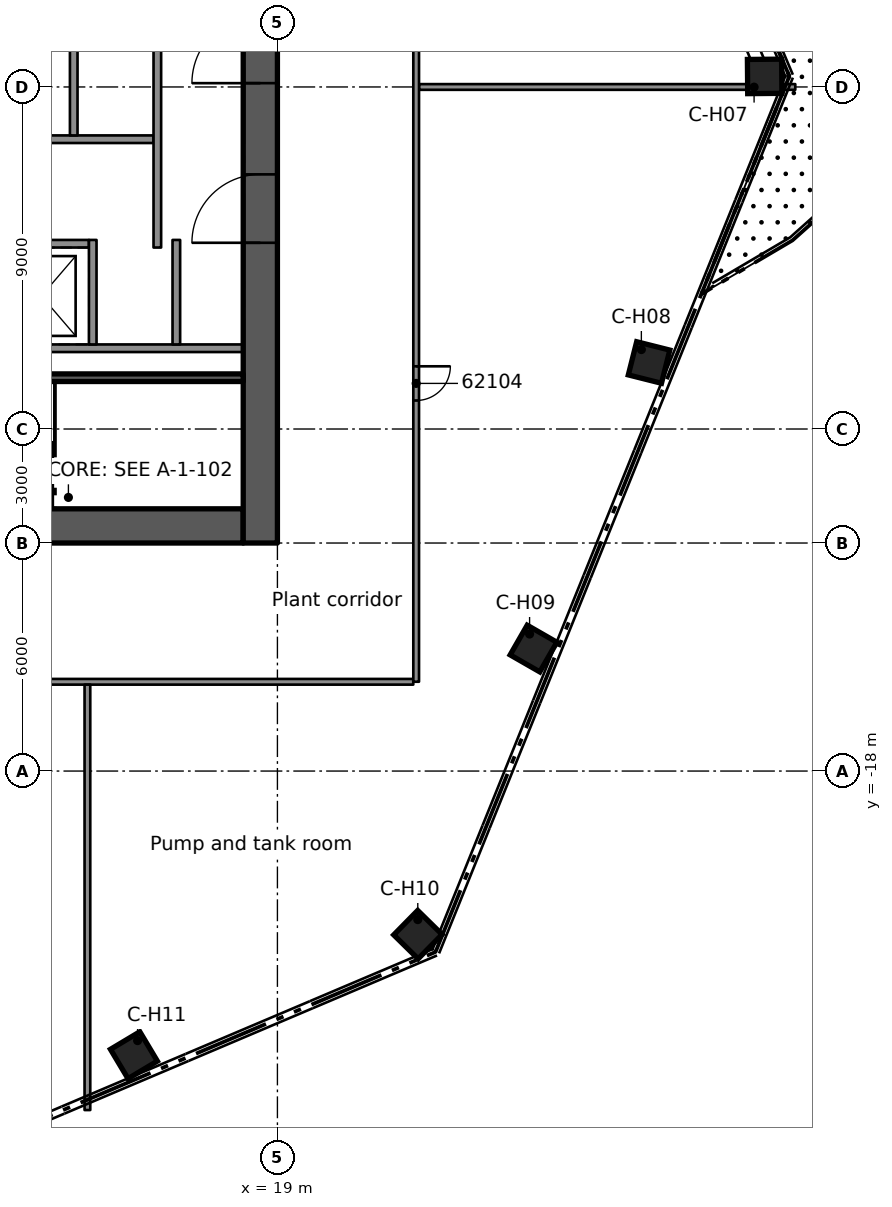
"""IFC4 building model, lengths in metres.
Left out: names, types, materials, properties, quantities, classifications, styles, units other than length and angle.
Written with IfcOpenShell. Run it as: python <this file> out.ifc"""

import sys

from ifc_helpers import new_model, si_unit, direction, frame, frame_2d, origin, origin_2d, place, context, subcontext, project, spatial, rectangle, extrude, element, fill, save


model = new_model("IFC4")
c1 = context("Model", 3, precision=1e-05, world=origin(), true_north=direction((0.0, 1.0)))
c2 = subcontext(c1, "Body", "Model", "MODEL_VIEW")
j1 = project(units=[si_unit("LENGTHUNIT", "METRE"), si_unit("PLANEANGLEUNIT", "RADIAN")], contexts=[c1])
p1 = place(None, origin())
s1 = spatial("IfcSite", under=j1, at=p1, CompositionType="ELEMENT")
p2 = place(p1, origin())
s2 = spatial("IfcBuilding", under=s1, at=p2, CompositionType="ELEMENT")
p3 = place(p2, frame((0.0, 0.0, 299.9)))
s3 = spatial("IfcBuildingStorey", under=s2, at=p3, CompositionType="ELEMENT", Elevation=299.9)
p4 = place(p3, frame((8.9, -11.55, 0.0), z_axis=(0.0, 0.0, 1.0), x_axis=(1.0, 0.0, 0.0)))
e1 = element("IfcWall", 1, at=p4, inside=s3, PredefinedType="SHEAR", context=c2, shape_type="SweptSolid", body=[
    extrude(rectangle(XDim=9.2, YDim=0.9, at=frame_2d((4.6, 0.0))), origin(), (0.0, 0.0, 1.0), 4.4),
])
p5 = place(p4, frame((3.0, 0.0, 0.0)))
e2 = element("IfcOpeningElement", 2, at=p5, cuts=e1, PredefinedType="OPENING", context=c2, shape_type="SweptSolid", body=[
    extrude(rectangle(XDim=1.1, YDim=2.1, at=frame_2d((0.55, 1.05))), frame((0.0, 0.46, 0.0), z_axis=(0.0, -1.0, 0.0), x_axis=(1.0, 0.0, 0.0)), (0.0, 0.0, 1.0), 0.92),
])
p6 = place(p3, frame((18.55, -12.0, 0.0), z_axis=(0.0, 0.0, 1.0), x_axis=(0.0, 1.0, 0.0)))
e3 = element("IfcWall", 3, at=p6, inside=s3, PredefinedType="SHEAR", context=c2, shape_type="SweptSolid", body=[
    extrude(rectangle(XDim=24.0, YDim=0.9, at=frame_2d((12.0, 0.0))), origin(), (0.0, 0.0, 1.0), 4.4),
])
p7 = place(p6, frame((16.3, 0.0, 0.0)))
e4 = element("IfcOpeningElement", 4, at=p7, cuts=e3, PredefinedType="OPENING", context=c2, shape_type="SweptSolid", body=[
    extrude(rectangle(XDim=1.8, YDim=2.1, at=frame_2d((0.9, 1.05))), frame((0.0, 0.46, 0.0), z_axis=(0.0, -1.0, 0.0), x_axis=(1.0, 0.0, 0.0)), (0.0, 0.0, 1.0), 0.92),
])
p8 = place(p6, frame((12.1, 0.0, 0.0)))
e5 = element("IfcOpeningElement", 5, at=p8, cuts=e3, PredefinedType="OPENING", context=c2, shape_type="SweptSolid", body=[
    extrude(rectangle(XDim=1.8, YDim=2.1, at=frame_2d((0.9, 1.05))), frame((0.0, 0.46, 0.0), z_axis=(0.0, -1.0, 0.0), x_axis=(1.0, 0.0, 0.0)), (0.0, 0.0, 1.0), 0.92),
])
p9 = place(p6, frame((7.9, 0.0, 0.0)))
e6 = element("IfcOpeningElement", 6, at=p9, cuts=e3, PredefinedType="OPENING", context=c2, shape_type="SweptSolid", body=[
    extrude(rectangle(XDim=1.8, YDim=2.1, at=frame_2d((0.9, 1.05))), frame((0.0, 0.46, 0.0), z_axis=(0.0, -1.0, 0.0), x_axis=(1.0, 0.0, 0.0)), (0.0, 0.0, 1.0), 0.92),
])
for number, where, z_axis, x_axis in (
    (7, (31.821, 0.278, 0.0), (0.0, 0.0, 1.0), (1.0, 0.009, 0.0)),
    (8, (28.78, -7.25, 0.0), (0.0, 0.0, 1.0), (0.97, -0.244, 0.0)),
    (9, (25.739, -14.777, 0.0), (0.0, 0.0, 1.0), (0.867, -0.498, 0.0)),
    (10, (22.697, -22.305, 0.0), (0.0, 0.0, 1.0), (0.713, -0.701, 0.0)),
    (11, (15.224, -25.477, 0.0), (0.0, 0.0, 1.0), (0.513, -0.858, 0.0)),
):
    element("IfcColumn", number, at=place(p3, frame(where, z_axis=z_axis, x_axis=x_axis)), inside=s3, PredefinedType="COLUMN", context=c2, shape_type="SweptSolid", body=[
        extrude(rectangle(XDim=0.9, YDim=0.9, at=origin_2d()), origin(), (0.0, 0.0, 1.0), 4.4),
    ])
p10 = place(p3, frame((11.54, -6.875, 0.0), z_axis=(0.0, 0.0, 1.0), x_axis=(1.0, 0.0, 0.0)))
e12 = element("IfcWall", 12, at=p10, inside=s3, PredefinedType="SOLIDWALL", context=c2, shape_type="SweptSolid", body=[
    extrude(rectangle(XDim=6.56, YDim=0.2, at=frame_2d((3.28, 0.0))), origin(), (0.0, 0.0, 1.0), 3.98),
])
p11 = place(p3, frame((11.54, -1.375, 0.0), z_axis=(0.0, 0.0, 1.0), x_axis=(1.0, 0.0, 0.0)))
e13 = element("IfcWall", 13, at=p11, inside=s3, PredefinedType="SOLIDWALL", context=c2, shape_type="SweptSolid", body=[
    extrude(rectangle(XDim=4.2, YDim=0.2, at=frame_2d((2.1, 0.0))), origin(), (0.0, 0.0, 1.0), 3.98),
])
p12 = place(p3, frame((11.54, -4.125, 0.0), z_axis=(0.0, 0.0, 1.0), x_axis=(1.0, 0.0, 0.0)))
e14 = element("IfcWall", 14, at=p12, inside=s3, PredefinedType="SOLIDWALL", context=c2, shape_type="SweptSolid", body=[
    extrude(rectangle(XDim=2.5, YDim=0.2, at=frame_2d((1.25, 0.0))), origin(), (0.0, 0.0, 1.0), 3.98),
])
p13 = place(p3, frame((13.64, 6.775, 0.0), z_axis=(0.0, 0.0, 1.0), x_axis=(0.0, -1.0, 0.0)))
e15 = element("IfcWall", 15, at=p13, inside=s3, PredefinedType="SOLIDWALL", context=c2, shape_type="SweptSolid", body=[
    extrude(rectangle(XDim=8.05, YDim=0.2, at=frame_2d((4.025, 0.0))), origin(), (0.0, 0.0, 1.0), 3.98),
])
p14 = place(p3, frame((14.14, -4.025, 0.0), z_axis=(0.0, 0.0, 1.0), x_axis=(0.0, -1.0, 0.0)))
e16 = element("IfcWall", 16, at=p14, inside=s3, PredefinedType="SOLIDWALL", context=c2, shape_type="SweptSolid", body=[
    extrude(rectangle(XDim=2.75, YDim=0.2, at=frame_2d((1.375, 0.0))), origin(), (0.0, 0.0, 1.0), 3.98),
])
p15 = place(p3, frame((15.84, 4.025, 0.0), z_axis=(0.0, 0.0, 1.0), x_axis=(0.0, -1.0, 0.0)))
e17 = element("IfcWall", 17, at=p15, inside=s3, PredefinedType="SOLIDWALL", context=c2, shape_type="SweptSolid", body=[
    extrude(rectangle(XDim=8.25, YDim=0.2, at=frame_2d((4.125, 0.0))), origin(), (0.0, 0.0, 1.0), 3.98),
])
p16 = place(p15, frame((0.875, 0.0, 0.0)))
e18 = element("IfcOpeningElement", 18, at=p16, cuts=e17, PredefinedType="OPENING", context=c2, shape_type="SweptSolid", body=[
    extrude(rectangle(XDim=0.8, YDim=2.1, at=frame_2d((0.4, 1.05))), frame((0.0, 0.11, 0.0), z_axis=(0.0, -1.0, 0.0), x_axis=(1.0, 0.0, 0.0)), (0.0, 0.0, 1.0), 0.22),
])
p17 = place(p3, frame((16.34, -4.025, 0.0), z_axis=(0.0, 0.0, 1.0), x_axis=(0.0, -1.0, 0.0)))
e19 = element("IfcWall", 19, at=p17, inside=s3, PredefinedType="SOLIDWALL", context=c2, shape_type="SweptSolid", body=[
    extrude(rectangle(XDim=2.75, YDim=0.2, at=frame_2d((1.375, 0.0))), origin(), (0.0, 0.0, 1.0), 3.98),
])
p18 = place(p3, frame((11.54, -7.65, 0.0), z_axis=(0.0, 0.0, 1.0), x_axis=(1.0, 0.0, 0.0)))
e20 = element("IfcWall", 20, at=p18, inside=s3, PredefinedType="SOLIDWALL", context=c2, shape_type="SweptSolid", body=[
    extrude(rectangle(XDim=6.56, YDim=0.2, at=frame_2d((3.28, 0.0))), origin(), (0.0, 0.0, 1.0), 3.98),
])
p19 = place(p3, frame((11.591, -15.651, 0.0), z_axis=(0.0, 0.0, 1.0), x_axis=(1.0, 0.0, 0.0)))
e21 = element("IfcWall", 21, at=p19, inside=s3, PredefinedType="PARTITIONING", context=c2, shape_type="SweptSolid", body=[
    extrude(rectangle(XDim=10.984, YDim=0.15, at=frame_2d((5.492, 0.0))), origin(), (0.0, 0.0, 1.0), 3.98),
])
p20 = place(p3, frame((22.726, 0.0, 0.0), z_axis=(0.0, 0.0, 1.0), x_axis=(1.0, 0.0, 0.0)))
e22 = element("IfcWall", 22, at=p20, inside=s3, PredefinedType="PARTITIONING", context=c2, shape_type="SweptSolid", body=[
    extrude(rectangle(XDim=9.901, YDim=0.15, at=frame_2d((4.95, 0.0))), origin(), (0.0, 0.0, 1.0), 3.98),
])
p21 = place(p3, frame((22.651, 15.65, 0.0), z_axis=(0.0, 0.0, 1.0), x_axis=(0.0, -1.0, 0.0)))
e23 = element("IfcWall", 23, at=p21, inside=s3, PredefinedType="PARTITIONING", context=c2, shape_type="SweptSolid", body=[
    extrude(rectangle(XDim=31.3, YDim=0.15, at=frame_2d((15.65, 0.0))), origin(), (0.0, 0.0, 1.0), 3.98),
])
p22 = place(p21, frame((23.0, 0.0, 0.0)))
e24 = element("IfcOpeningElement", 24, at=p22, cuts=e23, PredefinedType="OPENING", context=c2, shape_type="SweptSolid", body=[
    extrude(rectangle(XDim=0.9, YDim=2.1, at=frame_2d((0.45, 1.05))), frame((0.0, 0.085, 0.0), z_axis=(0.0, -1.0, 0.0), x_axis=(1.0, 0.0, 0.0)), (0.0, 0.0, 1.0), 0.17),
])
p23 = place(p21, frame((7.35, 0.0, 0.0)))
e25 = element("IfcOpeningElement", 25, at=p23, cuts=e23, PredefinedType="OPENING", context=c2, shape_type="SweptSolid", body=[
    extrude(rectangle(XDim=0.9, YDim=2.1, at=frame_2d((0.45, 1.05))), frame((0.0, 0.085, 0.0), z_axis=(0.0, -1.0, 0.0), x_axis=(1.0, 0.0, 0.0)), (0.0, 0.0, 1.0), 0.17),
])
p24 = place(p3, frame((14.0, -26.92, 0.0), z_axis=(0.0, 0.0, 1.0), x_axis=(0.0, 1.0, 0.0)))
e26 = element("IfcWall", 26, at=p24, inside=s3, PredefinedType="PARTITIONING", context=c2, shape_type="SweptSolid", body=[
    extrude(rectangle(XDim=11.194, YDim=0.15, at=frame_2d((5.597, 0.0))), origin(), (0.0, 0.0, 1.0), 3.98),
])
p25 = place(p8, origin())
e27 = element("IfcDoor", 27, at=p25, inside=s3, OperationType="SINGLE_SWING_RIGHT", PredefinedType="DOOR", context=c2, shape_type="SweptSolid", body=[
    extrude(rectangle(XDim=1.8, YDim=2.1, at=frame_2d((0.9, 1.05))), frame((0.0, 0.025, 0.0), z_axis=(0.0, -1.0, 0.0), x_axis=(1.0, 0.0, 0.0)), (0.0, 0.0, 1.0), 0.05),
])
fill(e5, e27)
p26 = place(p9, origin())
e28 = element("IfcDoor", 28, at=p26, inside=s3, OperationType="SINGLE_SWING_LEFT", PredefinedType="DOOR", context=c2, shape_type="SweptSolid", body=[
    extrude(rectangle(XDim=1.8, YDim=2.1, at=frame_2d((0.9, 1.05))), frame((0.0, 0.025, 0.0), z_axis=(0.0, -1.0, 0.0), x_axis=(1.0, 0.0, 0.0)), (0.0, 0.0, 1.0), 0.05),
])
fill(e6, e28)
p27 = place(p22, origin())
e29 = element("IfcDoor", 29, at=p27, inside=s3, OperationType="SINGLE_SWING_RIGHT", PredefinedType="DOOR", context=c2, shape_type="SweptSolid", body=[
    extrude(rectangle(XDim=0.9, YDim=2.1, at=frame_2d((0.45, 1.05))), frame((0.0, 0.025, 0.0), z_axis=(0.0, -1.0, 0.0), x_axis=(1.0, 0.0, 0.0)), (0.0, 0.0, 1.0), 0.05),
])
fill(e24, e29)
save(model, sys.argv[1])
